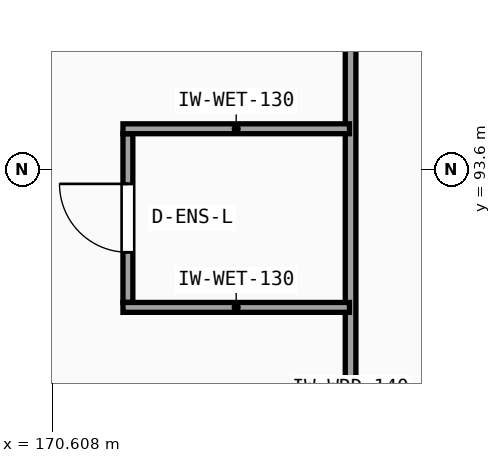
"""IFC4 building model, lengths in metres.
Left out: names, types, materials, properties, quantities, classifications, styles, units other than length and angle.
Written with IfcOpenShell. Run it as: python <this file> out.ifc"""

import sys

from ifc_helpers import new_model, si_unit, direction, frame, frame_2d, origin, place, context, subcontext, project, spatial, rectangle, extrude, element, fill, save


model = new_model("IFC4")
c1 = context("Model", 3, precision=1e-05, world=origin(), true_north=direction((0.0, 1.0)))
c2 = subcontext(c1, "Body", "Model", "MODEL_VIEW")
j1 = project(units=[si_unit("LENGTHUNIT", "METRE"), si_unit("PLANEANGLEUNIT", "RADIAN")], contexts=[c1])
p1 = place(None, origin())
s1 = spatial("IfcSite", under=j1, at=p1, CompositionType="ELEMENT")
p2 = place(p1, origin())
s2 = spatial("IfcBuilding", under=s1, at=p2, CompositionType="ELEMENT")
p3 = place(p2, frame((0.0, 0.0, 27.0)))
s3 = spatial("IfcBuildingStorey", under=s2, at=p3, CompositionType="ELEMENT", Elevation=27.0)
p4 = place(p3, frame((174.533, 82.49, 0.0), z_axis=(0.0, 0.0, 1.0), x_axis=(0.0, 1.0, 0.0)))
e1 = element("IfcWall", 1, at=p4, inside=s3, PredefinedType="PARTITIONING", context=c2, shape_type="SweptSolid", body=[
    extrude(rectangle(XDim=14.225, YDim=0.14, at=frame_2d((7.113, 0.0))), origin(), (0.0, 0.0, 1.0), 3.26),
])
p5 = place(p3, frame((171.603, 91.85, 0.0), z_axis=(0.0, 0.0, 1.0), x_axis=(0.0, 1.0, 0.0)))
e2 = element("IfcWall", 2, at=p5, inside=s3, PredefinedType="PARTITIONING", context=c2, shape_type="SweptSolid", body=[
    extrude(rectangle(XDim=2.22, YDim=0.13, at=frame_2d((1.11, 0.0))), origin(), (0.0, 0.0, 1.0), 3.26),
])
p6 = place(p5, frame((0.66, 0.0, 0.0)))
e3 = element("IfcOpeningElement", 3, at=p6, cuts=e2, PredefinedType="OPENING", context=c2, shape_type="SweptSolid", body=[
    extrude(rectangle(XDim=0.9, YDim=2.1, at=frame_2d((0.45, 1.05))), frame((0.0, 0.075, 0.0), z_axis=(0.0, -1.0, 0.0), x_axis=(1.0, 0.0, 0.0)), (0.0, 0.0, 1.0), 0.15),
])
for number, where, z_axis, x_axis in (
    (4, (171.538, 91.785, 0.0), (0.0, 0.0, 1.0), (1.0, 0.0, 0.0)),
    (5, (171.538, 94.135, 0.0), (0.0, 0.0, 1.0), (1.0, 0.0, 0.0)),
):
    element("IfcWall", number, at=place(p3, frame(where, z_axis=z_axis, x_axis=x_axis)), inside=s3, PredefinedType="PARTITIONING", context=c2, shape_type="SweptSolid", body=[
        extrude(rectangle(XDim=2.98, YDim=0.13, at=frame_2d((1.49, 0.0))), origin(), (0.0, 0.0, 1.0), 3.77),
    ])
p7 = place(p6, origin())
e6 = element("IfcDoor", 6, at=p7, inside=s3, OperationType="SINGLE_SWING_RIGHT", PredefinedType="DOOR", context=c2, shape_type="SweptSolid", body=[
    extrude(rectangle(XDim=0.9, YDim=2.1, at=frame_2d((0.45, 1.05))), frame((0.0, 0.025, 0.0), z_axis=(0.0, -1.0, 0.0), x_axis=(1.0, 0.0, 0.0)), (0.0, 0.0, 1.0), 0.05),
])
fill(e3, e6)
save(model, sys.argv[1])
